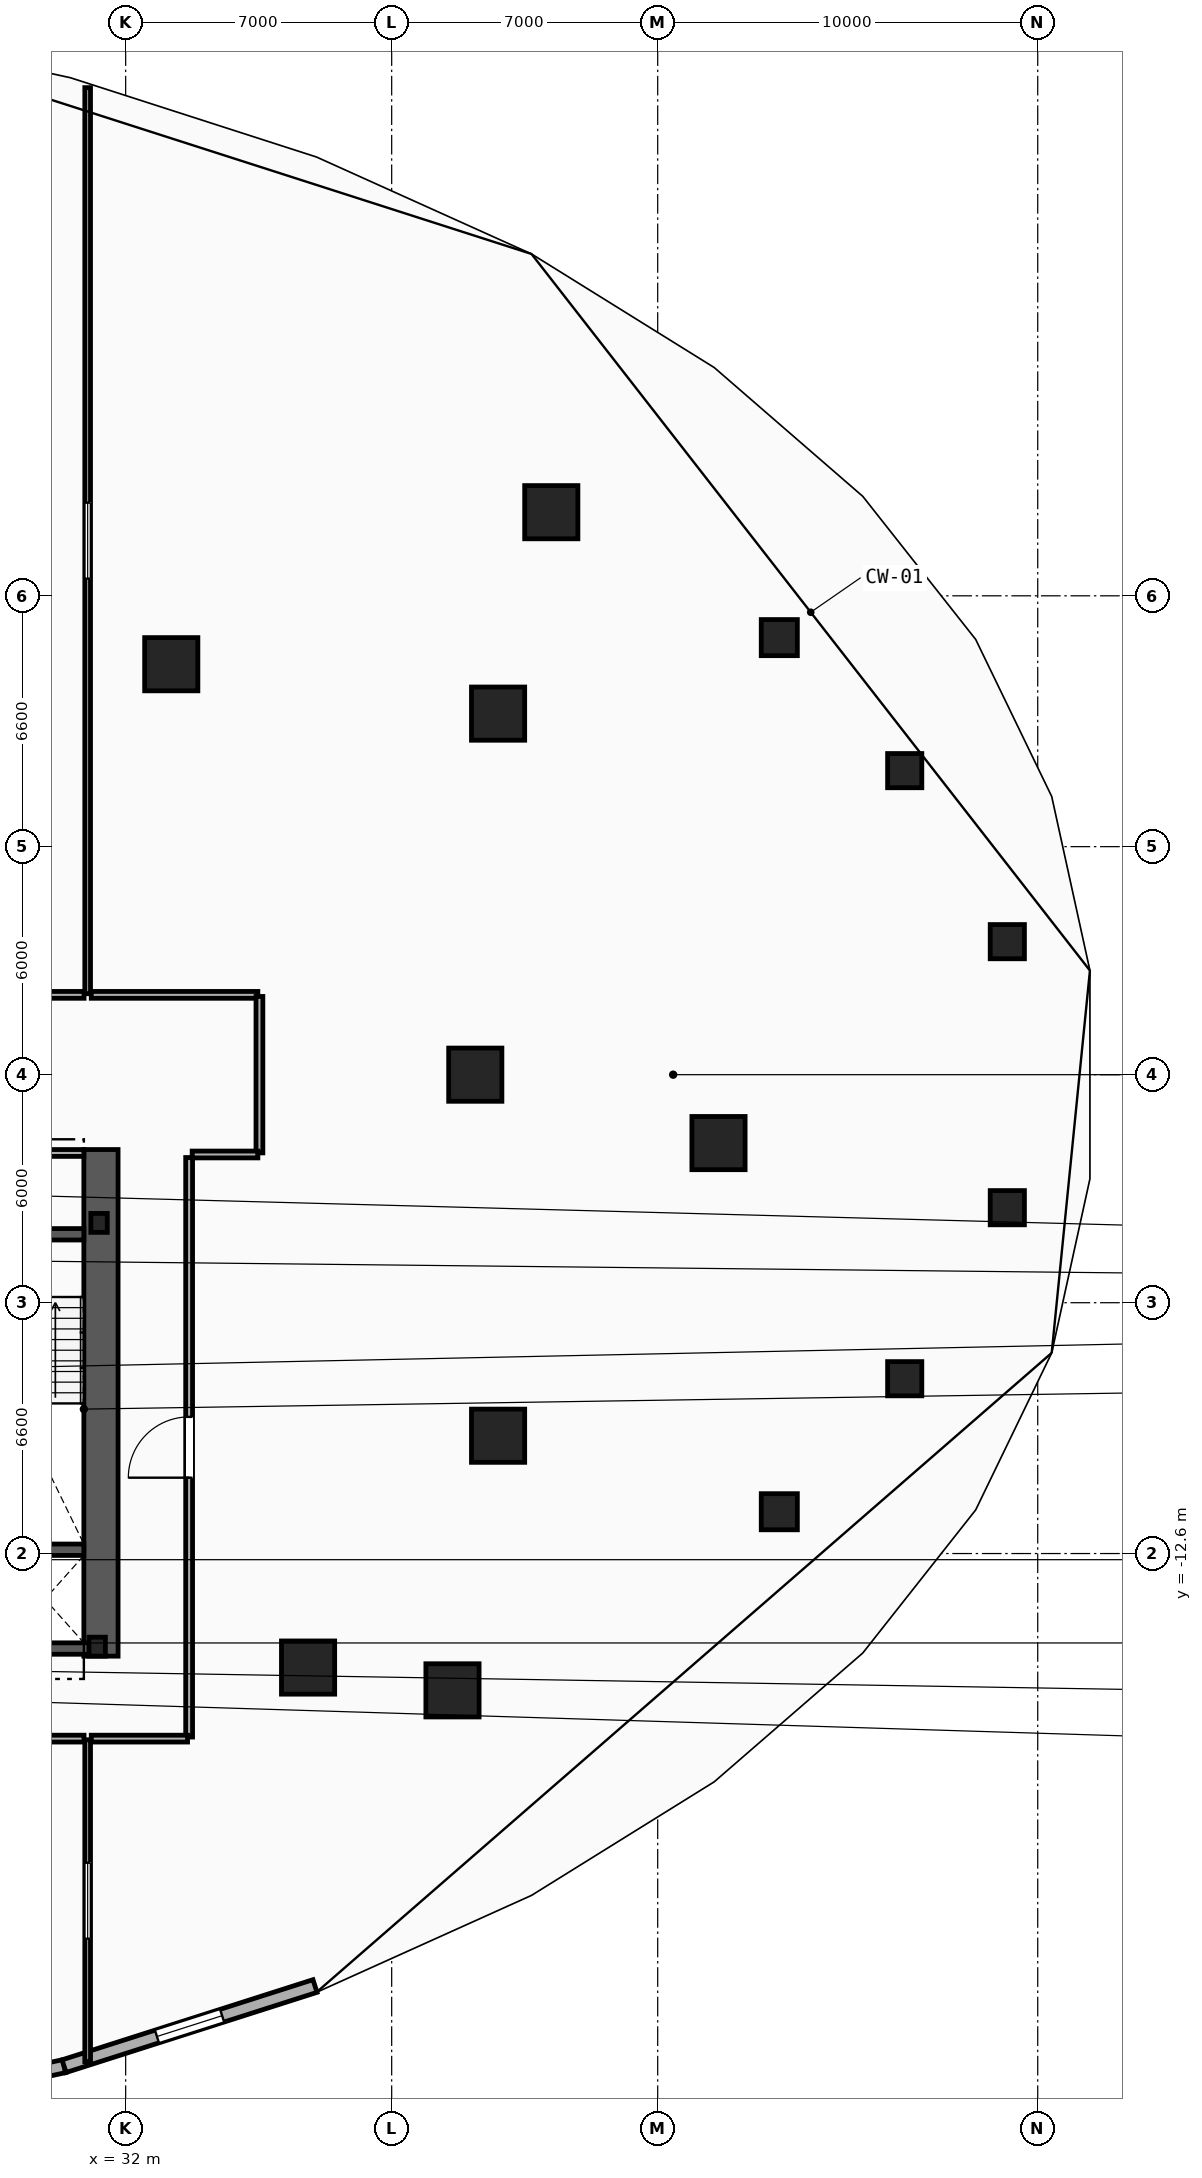
"""IFC4 building model, lengths in metres.
Left out: names, types, materials, properties, quantities, classifications, styles, units other than length and angle.
Written with IfcOpenShell. Run it as: python <this file> out.ifc"""

import sys

from ifc_helpers import new_model, si_unit, direction, frame, frame_2d, origin, origin_2d, place, context, subcontext, project, spatial, rectangle, circle, i_section, extrude, element, fill, save


model = new_model("IFC4")
c1 = context("Model", 3, precision=1e-05, world=origin(), true_north=direction((0.0, 1.0)))
c2 = subcontext(c1, "Body", "Model", "MODEL_VIEW")
j1 = project(units=[si_unit("LENGTHUNIT", "METRE"), si_unit("PLANEANGLEUNIT", "RADIAN")], contexts=[c1])
p1 = place(None, origin())
s1 = spatial("IfcSite", under=j1, at=p1, CompositionType="ELEMENT")
p2 = place(p1, origin())
s2 = spatial("IfcBuilding", under=s1, at=p2, CompositionType="ELEMENT")
p3 = place(p2, frame((0.0, 0.0, 16.0)))
s3 = spatial("IfcBuildingStorey", under=s2, at=p3, CompositionType="ELEMENT", Elevation=16.0)
for number, where, z_axis, x_axis in (
    (1, (31.3, -3.9, 0.0), (0.0, 0.0, 1.0), (1.0, 0.0, 0.0)),
    (2, (31.25, -15.05, 0.0), (0.0, 0.0, 1.0), (1.0, 0.0, 0.0)),
):
    element("IfcColumn", number, at=place(p3, frame(where, z_axis=z_axis, x_axis=x_axis)), inside=s3, PredefinedType="COLUMN", context=c2, shape_type="SweptSolid", body=[
        extrude(i_section(OverallWidth=0.432, OverallDepth=0.498, WebThickness=0.056, FlangeThickness=0.089, FilletRadius=0.018, at=origin_2d()), origin(), (0.0, 0.0, 1.0), 4.0),
    ])
for number, where, z_axis, x_axis in (
    (3, (41.2, 0.0, 0.0), (0.0, 0.0, 1.0), (1.0, 0.0, 0.0)),
    (4, (41.8, -9.5, 0.0), (0.0, 0.0, 1.0), (1.0, 0.0, 0.0)),
    (5, (36.8, -15.6, 0.0), (0.0, 0.0, 1.0), (1.0, 0.0, 0.0)),
    (6, (41.8, 9.5, 0.0), (0.0, 0.0, 1.0), (1.0, 0.0, 0.0)),
    (7, (33.2, 10.8, 0.0), (0.0, 0.0, 1.0), (1.0, 0.0, 0.0)),
    (8, (40.6, -16.2, 0.0), (0.0, 0.0, 1.0), (1.0, 0.0, 0.0)),
    (9, (47.6, -1.8, 0.0), (0.0, 0.0, 1.0), (1.0, 0.0, 0.0)),
    (10, (43.2, 14.8, 0.0), (0.0, 0.0, 1.0), (1.0, 0.0, 0.0)),
):
    element("IfcColumn", number, at=place(p3, frame(where, z_axis=z_axis, x_axis=x_axis)), inside=s3, PredefinedType="COLUMN", context=c2, shape_type="SweptSolid", body=[
        extrude(rectangle(XDim=1.4, YDim=1.4, at=origin_2d()), origin(), (0.0, 0.0, 1.0), 4.0),
    ])
for number, where, z_axis, x_axis in (
    (11, (49.2, 11.5, 0.0), (0.0, 0.0, 1.0), (1.0, 0.0, 0.0)),
    (12, (49.2, -11.5, 0.0), (0.0, 0.0, 1.0), (1.0, 0.0, 0.0)),
):
    element("IfcColumn", number, at=place(p3, frame(where, z_axis=z_axis, x_axis=x_axis)), inside=s3, PredefinedType="PILASTER", context=c2, shape_type="SweptSolid", body=[
        extrude(circle(Radius=0.475, at=origin_2d()), origin(), (0.0, 0.0, 1.0), 4.0),
    ])
for number, where, z_axis, x_axis in (
    (13, (52.5, -8.0, -1.0), (0.0, 0.0, 1.0), (1.0, 0.0, 0.0)),
    (14, (52.5, 8.0, -1.0), (0.0, 0.0, 1.0), (1.0, 0.0, 0.0)),
    (15, (55.2, -3.5, -1.0), (0.0, 0.0, 1.0), (1.0, 0.0, 0.0)),
    (16, (55.2, 3.5, -1.0), (0.0, 0.0, 1.0), (1.0, 0.0, 0.0)),
):
    element("IfcColumn", number, at=place(p3, frame(where, z_axis=z_axis, x_axis=x_axis)), inside=s3, PredefinedType="COLUMN", context=c2, shape_type="SweptSolid", body=[
        extrude(rectangle(XDim=0.9, YDim=0.9, at=origin_2d()), origin(), (0.0, 0.0, 1.0), 4.5),
    ])
p4 = place(p3, frame((23.14, -27.652, 0.0), z_axis=(0.0, 0.0, 1.0), x_axis=(0.977456656467, 0.211136175795, 0.0)))
e17 = element("IfcWall", 17, at=p4, inside=s3, PredefinedType="SOLIDWALL", context=c2, shape_type="SweptSolid", body=[
    extrude(rectangle(XDim=7.406, YDim=0.35, at=frame_2d((3.703, 0.0))), origin(), (0.0, 0.0, 1.0), 3.65),
])
p5 = place(p4, frame((2.803, 0.0, 0.85)))
e18 = element("IfcOpeningElement", 18, at=p5, cuts=e17, PredefinedType="OPENING", context=c2, shape_type="SweptSolid", body=[
    extrude(rectangle(XDim=1.8, YDim=2.4, at=frame_2d((0.9, 1.2))), frame((0.0, 0.185, 0.0), z_axis=(0.0, -1.0, 0.0), x_axis=(1.0, 0.0, 0.0)), (0.0, 0.0, 1.0), 0.37),
])
p6 = place(p3, frame((30.379, -26.089, 0.0), z_axis=(0.0, 0.0, 1.0), x_axis=(0.952587993211, 0.304263233385, 0.0)))
e19 = element("IfcWall", 19, at=p6, inside=s3, PredefinedType="SOLIDWALL", context=c2, shape_type="SweptSolid", body=[
    extrude(rectangle(XDim=6.932, YDim=0.35, at=frame_2d((3.466, 0.0))), origin(), (0.0, 0.0, 1.0), 3.65),
])
p7 = place(p6, frame((2.566, 0.0, 0.85)))
e20 = element("IfcOpeningElement", 20, at=p7, cuts=e19, PredefinedType="OPENING", context=c2, shape_type="SweptSolid", body=[
    extrude(rectangle(XDim=1.8, YDim=2.4, at=frame_2d((0.9, 1.2))), frame((0.0, 0.185, 0.0), z_axis=(0.0, -1.0, 0.0), x_axis=(1.0, 0.0, 0.0)), (0.0, 0.0, 1.0), 0.37),
])
p8 = place(p3, frame((31.35, -15.3, 0.0), z_axis=(0.0, 0.0, 1.0), x_axis=(0.0, 1.0, 0.0)))
e21 = element("IfcWall", 21, at=p8, inside=s3, PredefinedType="SHEAR", context=c2, shape_type="SweptSolid", body=[
    extrude(rectangle(XDim=13.33, YDim=0.9, at=frame_2d((6.665, 0.0))), origin(), (0.0, 0.0, 1.0), 3.65),
])
p9 = place(p3, frame((27.74, -4.2, 0.0), z_axis=(0.0, 0.0, 1.0), x_axis=(1.0, 0.0, 0.0)))
e22 = element("IfcWall", 22, at=p9, inside=s3, PredefinedType="SHEAR", context=c2, shape_type="SweptSolid", body=[
    extrude(rectangle(XDim=3.16, YDim=0.3, at=frame_2d((1.58, 0.0))), origin(), (0.0, 0.0, 1.0), 3.65),
])
p10 = place(p9, frame((1.03, 0.0, 0.0)))
e23 = element("IfcOpeningElement", 23, at=p10, cuts=e22, PredefinedType="OPENING", context=c2, shape_type="SweptSolid", body=[
    extrude(rectangle(XDim=1.1, YDim=2.15, at=frame_2d((0.55, 1.075))), frame((0.0, 0.16, 0.0), z_axis=(0.0, -1.0, 0.0), x_axis=(1.0, 0.0, 0.0)), (0.0, 0.0, 1.0), 0.32),
])
p11 = place(p3, frame((27.74, -12.5, 0.0), z_axis=(0.0, 0.0, 1.0), x_axis=(1.0, 0.0, 0.0)))
e24 = element("IfcWall", 24, at=p11, inside=s3, PredefinedType="SHEAR", context=c2, shape_type="SweptSolid", body=[
    extrude(rectangle(XDim=3.16, YDim=0.3, at=frame_2d((1.58, 0.0))), origin(), (0.0, 0.0, 1.0), 3.65),
])
p12 = place(p3, frame((27.74, -2.06, 0.0), z_axis=(0.0, 0.0, 1.0), x_axis=(1.0, 0.0, 0.0)))
e25 = element("IfcWall", 25, at=p12, inside=s3, PredefinedType="PARTITIONING", context=c2, shape_type="SweptSolid", body=[
    extrude(rectangle(XDim=3.16, YDim=0.18, at=frame_2d((1.58, 0.0))), origin(), (0.0, 0.0, 1.0), 3.65),
])
p13 = place(p12, frame((0.98, 0.0, 0.0)))
e26 = element("IfcOpeningElement", 26, at=p13, cuts=e25, PredefinedType="OPENING", context=c2, shape_type="SweptSolid", body=[
    extrude(rectangle(XDim=1.2, YDim=2.15, at=frame_2d((0.6, 1.075))), frame((0.0, 0.1, 0.0), z_axis=(0.0, -1.0, 0.0), x_axis=(1.0, 0.0, 0.0)), (0.0, 0.0, 1.0), 0.2),
])
p14 = place(p3, frame((28.7, -15.1, 0.0), z_axis=(0.0, 0.0, 1.0), x_axis=(1.0, 0.0, 0.0)))
e27 = element("IfcWall", 27, at=p14, inside=s3, PredefinedType="SHEAR", context=c2, shape_type="SweptSolid", body=[
    extrude(rectangle(XDim=2.5, YDim=0.3, at=frame_2d((1.25, 0.0))), origin(), (0.0, 0.0, 1.0), 3.65),
])
p15 = place(p3, frame((31.0, -25.971, 0.0), z_axis=(0.0, 0.0, 1.0), x_axis=(0.0, 1.0, 0.0)))
e28 = element("IfcWall", 28, at=p15, inside=s3, PredefinedType="PARTITIONING", context=c2, shape_type="SweptSolid", body=[
    extrude(rectangle(XDim=8.471, YDim=0.15, at=frame_2d((4.236, 0.0))), origin(), (0.0, 0.0, 1.0), 3.65),
])
p16 = place(p15, frame((3.236, 0.0, 1.05)))
e29 = element("IfcOpeningElement", 29, at=p16, cuts=e28, PredefinedType="OPENING", context=c2, shape_type="SweptSolid", body=[
    extrude(rectangle(XDim=2.0, YDim=1.5, at=frame_2d((1.0, 0.75))), frame((0.0, 0.085, 0.0), z_axis=(0.0, -1.0, 0.0), x_axis=(1.0, 0.0, 0.0)), (0.0, 0.0, 1.0), 0.17),
])
p17 = place(p3, frame((31.0, 2.13, 0.0), z_axis=(0.0, 0.0, 1.0), x_axis=(0.0, 1.0, 0.0)))
e30 = element("IfcWall", 30, at=p17, inside=s3, PredefinedType="PARTITIONING", context=c2, shape_type="SweptSolid", body=[
    extrude(rectangle(XDim=23.841, YDim=0.15, at=frame_2d((11.921, 0.0))), origin(), (0.0, 0.0, 1.0), 3.65),
])
p18 = place(p17, frame((10.921, 0.0, 1.05)))
e31 = element("IfcOpeningElement", 31, at=p18, cuts=e30, PredefinedType="OPENING", context=c2, shape_type="SweptSolid", body=[
    extrude(rectangle(XDim=2.0, YDim=1.5, at=frame_2d((1.0, 0.75))), frame((0.0, 0.085, 0.0), z_axis=(0.0, -1.0, 0.0), x_axis=(1.0, 0.0, 0.0)), (0.0, 0.0, 1.0), 0.17),
])
p19 = place(p3, frame((16.822, -17.47, 0.0), z_axis=(0.0, 0.0, 1.0), x_axis=(1.0, 0.0, 0.0)))
e32 = element("IfcWall", 32, at=p19, inside=s3, PredefinedType="PARTITIONING", context=c2, shape_type="SweptSolid", body=[
    extrude(rectangle(XDim=14.083, YDim=0.18, at=frame_2d((7.042, 0.0))), origin(), (0.0, 0.0, 1.0), 3.65),
])
p20 = place(p19, frame((6.242, 0.0, 0.0)))
e33 = element("IfcOpeningElement", 33, at=p20, cuts=e32, PredefinedType="OPENING", context=c2, shape_type="SweptSolid", body=[
    extrude(rectangle(XDim=1.6, YDim=2.2, at=frame_2d((0.8, 1.1))), frame((0.0, 0.1, 0.0), z_axis=(0.0, -1.0, 0.0), x_axis=(1.0, 0.0, 0.0)), (0.0, 0.0, 1.0), 0.2),
])
p21 = place(p3, frame((33.67, -17.428, 0.0), z_axis=(0.0, 0.0, 1.0), x_axis=(0.0, 1.0, 0.0)))
e34 = element("IfcWall", 34, at=p21, inside=s3, PredefinedType="PARTITIONING", context=c2, shape_type="SweptSolid", body=[
    extrude(rectangle(XDim=15.249, YDim=0.18, at=frame_2d((7.624, 0.0))), origin(), (0.0, 0.0, 1.0), 3.65),
])
p22 = place(p21, frame((6.824, 0.0, 0.0)))
e35 = element("IfcOpeningElement", 35, at=p22, cuts=e34, PredefinedType="OPENING", context=c2, shape_type="SweptSolid", body=[
    extrude(rectangle(XDim=1.6, YDim=2.2, at=frame_2d((0.8, 1.1))), frame((0.0, 0.1, 0.0), z_axis=(0.0, -1.0, 0.0), x_axis=(1.0, 0.0, 0.0)), (0.0, 0.0, 1.0), 0.2),
])
p23 = place(p3, frame((35.479, 2.1, 0.0), z_axis=(0.0, 0.0, 1.0), x_axis=(-1.0, 0.0, 0.0)))
e36 = element("IfcWall", 36, at=p23, inside=s3, PredefinedType="PARTITIONING", context=c2, shape_type="SweptSolid", body=[
    extrude(rectangle(XDim=4.384, YDim=0.18, at=frame_2d((2.192, 0.0))), origin(), (0.0, 0.0, 1.0), 3.65),
])
p24 = place(p3, frame((35.52, -2.059, 0.0), z_axis=(0.0, 0.0, 1.0), x_axis=(0.0, 1.0, 0.0)))
e37 = element("IfcWall", 37, at=p24, inside=s3, PredefinedType="PARTITIONING", context=c2, shape_type="SweptSolid", body=[
    extrude(rectangle(XDim=4.117, YDim=0.18, at=frame_2d((2.059, 0.0))), origin(), (0.0, 0.0, 1.0), 3.65),
])
p25 = place(p3, frame((31.095, -17.47, 0.0), z_axis=(0.0, 0.0, 1.0), x_axis=(1.0, 0.0, 0.0)))
e38 = element("IfcWall", 38, at=p25, inside=s3, PredefinedType="PARTITIONING", context=c2, shape_type="SweptSolid", body=[
    extrude(rectangle(XDim=2.533, YDim=0.18, at=frame_2d((1.267, 0.0))), origin(), (0.0, 0.0, 1.0), 2.877),
])
p26 = place(p3, frame((33.75, -2.1, 0.0), z_axis=(0.0, 0.0, 1.0), x_axis=(1.0, 0.0, 0.0)))
e39 = element("IfcWall", 39, at=p26, inside=s3, PredefinedType="PARTITIONING", context=c2, shape_type="SweptSolid", body=[
    extrude(rectangle(XDim=1.729, YDim=0.18, at=frame_2d((0.864, 0.0))), origin(), (0.0, 0.0, 1.0), 3.65),
])
p27 = place(p3, frame((30.905, 2.1, 0.0), z_axis=(0.0, 0.0, 1.0), x_axis=(-1.0, 0.0, 0.0)))
e40 = element("IfcWall", 40, at=p27, inside=s3, PredefinedType="PARTITIONING", context=c2, shape_type="SweptSolid", body=[
    extrude(rectangle(XDim=14.305, YDim=0.18, at=frame_2d((7.152, 0.0))), origin(), (0.0, 0.0, 1.0), 3.65),
])
p28 = place(p27, frame((6.452, 0.0, 1.05)))
e41 = element("IfcOpeningElement", 41, at=p28, cuts=e40, PredefinedType="OPENING", context=c2, shape_type="SweptSolid", body=[
    extrude(rectangle(XDim=1.4, YDim=1.5, at=frame_2d((0.7, 0.75))), frame((0.0, 0.1, 0.0), z_axis=(0.0, -1.0, 0.0), x_axis=(1.0, 0.0, 0.0)), (0.0, 0.0, 1.0), 0.2),
])
p29 = place(p7, origin())
e42 = element("IfcWindow", 42, at=p29, inside=s3, PartitioningType="SINGLE_PANEL", PredefinedType="WINDOW", context=c2, shape_type="SweptSolid", body=[
    extrude(rectangle(XDim=1.8, YDim=2.4, at=frame_2d((0.9, 1.2))), frame((0.0, 0.03, 0.0), z_axis=(0.0, -1.0, 0.0), x_axis=(1.0, 0.0, 0.0)), (0.0, 0.0, 1.0), 0.06),
])
fill(e20, e42)
p30 = place(p22, origin())
e43 = element("IfcDoor", 43, at=p30, inside=s3, OperationType="SINGLE_SWING_LEFT", PredefinedType="DOOR", context=c2, shape_type="SweptSolid", body=[
    extrude(rectangle(XDim=1.6, YDim=2.2, at=frame_2d((0.8, 1.1))), frame((0.0, 0.025, 0.0), z_axis=(0.0, -1.0, 0.0), x_axis=(1.0, 0.0, 0.0)), (0.0, 0.0, 1.0), 0.05),
])
fill(e35, e43)
p31 = place(p16, origin())
e44 = element("IfcWindow", 44, at=p31, inside=s3, PartitioningType="SINGLE_PANEL", PredefinedType="WINDOW", context=c2, shape_type="SweptSolid", body=[
    extrude(rectangle(XDim=2.0, YDim=1.5, at=frame_2d((1.0, 0.75))), frame((0.0, 0.03, 0.0), z_axis=(0.0, -1.0, 0.0), x_axis=(1.0, 0.0, 0.0)), (0.0, 0.0, 1.0), 0.06),
])
fill(e29, e44)
p32 = place(p18, origin())
e45 = element("IfcWindow", 45, at=p32, inside=s3, PartitioningType="SINGLE_PANEL", PredefinedType="WINDOW", context=c2, shape_type="SweptSolid", body=[
    extrude(rectangle(XDim=2.0, YDim=1.5, at=frame_2d((1.0, 0.75))), frame((0.0, 0.03, 0.0), z_axis=(0.0, -1.0, 0.0), x_axis=(1.0, 0.0, 0.0)), (0.0, 0.0, 1.0), 0.06),
])
fill(e31, e45)
save(model, sys.argv[1])
